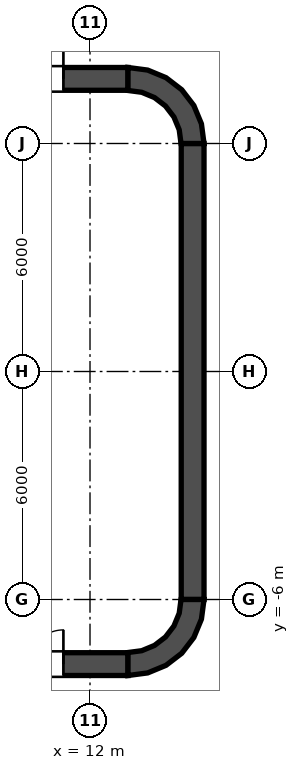
"""IFC4 building model, lengths in metres.
Left out: names, types, materials, properties, quantities, classifications, styles, units other than length and angle.
Written with IfcOpenShell. Run it as: python <this file> out.ifc"""

import sys

from ifc_helpers import new_model, si_unit, direction, frame, frame_2d, origin, place, context, subcontext, project, spatial, polyline, rectangle, outline, extrude, element, fill, save


model = new_model("IFC4")
c1 = context("Model", 3, precision=1e-05, world=origin(), true_north=direction((0.0, 1.0)))
c2 = subcontext(c1, "Body", "Model", "MODEL_VIEW")
j1 = project(units=[si_unit("LENGTHUNIT", "METRE"), si_unit("PLANEANGLEUNIT", "RADIAN")], contexts=[c1])
p1 = place(None, origin())
s1 = spatial("IfcSite", under=j1, at=p1, CompositionType="ELEMENT")
p2 = place(p1, origin())
s2 = spatial("IfcBuilding", under=s1, at=p2, CompositionType="ELEMENT")
p3 = place(p2, frame((0.0, 0.0, 31.4)))
s3 = spatial("IfcBuildingStorey", under=s2, at=p3, CompositionType="ELEMENT", Elevation=31.4)
p4 = place(p3, frame((-13.0, 7.7, 0.0), z_axis=(0.0, 0.0, 1.0), x_axis=(1.0, 0.0, 0.0)))
e1 = element("IfcWall", 1, at=p4, inside=s3, PredefinedType="SHEAR", context=c2, shape_type="SweptSolid", body=[
    extrude(rectangle(XDim=26.0, YDim=0.6, at=frame_2d((13.0, 0.0))), origin(), (0.0, 0.0, 1.0), 6.0),
])
p5 = place(p4, frame((1.7, 0.0, 0.0)))
e2 = element("IfcOpeningElement", 2, at=p5, cuts=e1, PredefinedType="OPENING", context=c2, shape_type="SweptSolid", body=[
    extrude(rectangle(XDim=1.8, YDim=2.1, at=frame_2d((0.9, 1.05))), frame((0.0, 0.3, 0.0), z_axis=(0.0, -1.0, 0.0), x_axis=(1.0, 0.0, 0.0)), (0.0, 0.0, 1.0), 0.6),
])
p6 = place(p4, frame((22.5, 0.0, 0.0)))
e3 = element("IfcOpeningElement", 3, at=p6, cuts=e1, PredefinedType="OPENING", context=c2, shape_type="SweptSolid", body=[
    extrude(rectangle(XDim=1.8, YDim=2.1, at=frame_2d((0.9, 1.05))), frame((0.0, 0.3, 0.0), z_axis=(0.0, -1.0, 0.0), x_axis=(1.0, 0.0, 0.0)), (0.0, 0.0, 1.0), 0.6),
])
p7 = place(p3, frame((-13.0, -7.7, 0.0), z_axis=(0.0, 0.0, 1.0), x_axis=(1.0, 0.0, 0.0)))
e4 = element("IfcWall", 4, at=p7, inside=s3, PredefinedType="SHEAR", context=c2, shape_type="SweptSolid", body=[
    extrude(rectangle(XDim=26.0, YDim=0.6, at=frame_2d((13.0, 0.0))), origin(), (0.0, 0.0, 1.0), 6.0),
])
p8 = place(p7, frame((1.7, 0.0, 0.0)))
e5 = element("IfcOpeningElement", 5, at=p8, cuts=e4, PredefinedType="OPENING", context=c2, shape_type="SweptSolid", body=[
    extrude(rectangle(XDim=1.8, YDim=2.1, at=frame_2d((0.9, 1.05))), frame((0.0, 0.3, 0.0), z_axis=(0.0, -1.0, 0.0), x_axis=(1.0, 0.0, 0.0)), (0.0, 0.0, 1.0), 0.6),
])
p9 = place(p7, frame((22.5, 0.0, 0.0)))
e6 = element("IfcOpeningElement", 6, at=p9, cuts=e4, PredefinedType="OPENING", context=c2, shape_type="SweptSolid", body=[
    extrude(rectangle(XDim=1.8, YDim=2.1, at=frame_2d((0.9, 1.05))), frame((0.0, 0.3, 0.0), z_axis=(0.0, -1.0, 0.0), x_axis=(1.0, 0.0, 0.0)), (0.0, 0.0, 1.0), 0.6),
])
p10 = place(p3, frame((14.7, -6.0, 0.0), z_axis=(0.0, 0.0, 1.0), x_axis=(0.0, 1.0, 0.0)))
e7 = element("IfcWall", 7, at=p10, inside=s3, PredefinedType="SHEAR", context=c2, shape_type="SweptSolid", body=[
    extrude(rectangle(XDim=12.0, YDim=0.6, at=frame_2d((6.0, 0.0))), origin(), (0.0, 0.0, 1.0), 6.0),
])
p11 = place(p3, origin())
e8 = element("IfcWall", 8, at=p11, inside=s3, PredefinedType="SHEAR", context=c2, shape_type="SweptSolid", body=[
    extrude(outline(polyline([(13.0, 8.0), (13.0, 7.395), (13.361, 7.347), (13.698, 7.208), (13.986, 6.986), (14.208, 6.698), (14.347, 6.361), (14.395, 6.0), (15.0, 6.0), (14.932, 6.518), (14.732, 7.0), (14.414, 7.414), (14.0, 7.732), (13.518, 7.932), (13.0, 8.0)])), origin(), (0.0, 0.0, 1.0), 6.0),
])
e9 = element("IfcWall", 9, at=p11, inside=s3, PredefinedType="SHEAR", context=c2, shape_type="SweptSolid", body=[
    extrude(outline(polyline([(15.0, -6.0), (14.395, -6.0), (14.347, -6.361), (14.208, -6.698), (13.986, -6.986), (13.698, -7.208), (13.361, -7.347), (13.0, -7.395), (13.0, -8.0), (13.518, -7.932), (14.0, -7.732), (14.414, -7.414), (14.732, -7.0), (14.932, -6.518), (15.0, -6.0)])), origin(), (0.0, 0.0, 1.0), 6.0),
])
p12 = place(p3, frame((11.8, -7.4, 0.0), z_axis=(0.0, 0.0, 1.0), x_axis=(0.0, 1.0, 0.0)))
e10 = element("IfcWall", 10, at=p12, inside=s3, PredefinedType="SOLIDWALL", context=c2, shape_type="SweptSolid", body=[
    extrude(rectangle(XDim=14.8, YDim=0.4, at=frame_2d((7.4, 0.0))), origin(), (0.0, 0.0, 1.0), 5.8),
])
p13 = place(p12, frame((11.2, 0.0, 0.0)))
e11 = element("IfcOpeningElement", 11, at=p13, cuts=e10, PredefinedType="OPENING", context=c2, shape_type="SweptSolid", body=[
    extrude(rectangle(XDim=1.1, YDim=2.1, at=frame_2d((0.55, 1.05))), frame((0.0, 0.2, 0.0), z_axis=(0.0, -1.0, 0.0), x_axis=(1.0, 0.0, 0.0)), (0.0, 0.0, 1.0), 0.4),
])
p14 = place(p12, frame((8.3, 0.0, 0.0)))
e12 = element("IfcOpeningElement", 12, at=p14, cuts=e10, PredefinedType="OPENING", context=c2, shape_type="SweptSolid", body=[
    extrude(rectangle(XDim=1.1, YDim=2.1, at=frame_2d((0.55, 1.05))), frame((0.0, 0.2, 0.0), z_axis=(0.0, -1.0, 0.0), x_axis=(1.0, 0.0, 0.0)), (0.0, 0.0, 1.0), 0.4),
])
p15 = place(p12, frame((5.4, 0.0, 0.0)))
e13 = element("IfcOpeningElement", 13, at=p15, cuts=e10, PredefinedType="OPENING", context=c2, shape_type="SweptSolid", body=[
    extrude(rectangle(XDim=1.1, YDim=2.1, at=frame_2d((0.55, 1.05))), frame((0.0, 0.2, 0.0), z_axis=(0.0, -1.0, 0.0), x_axis=(1.0, 0.0, 0.0)), (0.0, 0.0, 1.0), 0.4),
])
p16 = place(p12, frame((13.552, 0.0, 0.0)))
e14 = element("IfcOpeningElement", 14, at=p16, cuts=e10, PredefinedType="OPENING", context=c2, shape_type="SweptSolid", body=[
    extrude(rectangle(XDim=0.9, YDim=2.1, at=frame_2d((0.45, 1.05))), frame((0.0, 0.2, 0.0), z_axis=(0.0, -1.0, 0.0), x_axis=(1.0, 0.0, 0.0)), (0.0, 0.0, 1.0), 0.4),
])
p17 = place(p12, frame((0.347, 0.0, 0.0)))
e15 = element("IfcOpeningElement", 15, at=p17, cuts=e10, PredefinedType="OPENING", context=c2, shape_type="SweptSolid", body=[
    extrude(rectangle(XDim=0.9, YDim=2.1, at=frame_2d((0.45, 1.05))), frame((0.0, 0.2, 0.0), z_axis=(0.0, -1.0, 0.0), x_axis=(1.0, 0.0, 0.0)), (0.0, 0.0, 1.0), 0.4),
])
e16 = element("IfcWall", 16, at=p11, inside=s3, PredefinedType="SOLIDWALL", context=c2, shape_type="SweptSolid", body=[
    extrude(outline(polyline([(12.0, -5.675), (12.0, -5.925), (14.15, -5.925), (14.4, -5.925), (14.4, -5.675), (14.4, -3.025), (14.4, -2.775), (14.4, -0.125), (14.4, 0.125), (14.4, 2.775), (14.4, 3.025), (14.4, 5.675), (14.4, 5.925), (14.15, 5.925), (12.0, 5.925), (12.0, 5.675), (14.15, 5.675), (14.15, 3.025), (12.0, 3.025), (12.0, 2.775), (14.15, 2.775), (14.15, 0.125), (12.0, 0.125), (12.0, -0.125), (14.15, -0.125), (14.15, -2.775), (12.0, -2.775), (12.0, -3.025), (14.15, -3.025), (14.15, -5.675), (12.0, -5.675)])), origin(), (0.0, 0.0, 1.0), 5.8),
])
p18 = place(p13, origin())
e17 = element("IfcDoor", 17, at=p18, inside=s3, OperationType="DOUBLE_DOOR_SLIDING", PredefinedType="DOOR", context=c2, shape_type="SweptSolid", body=[
    extrude(rectangle(XDim=1.1, YDim=2.1, at=frame_2d((0.55, 1.05))), frame((0.0, 0.025, 0.0), z_axis=(0.0, -1.0, 0.0), x_axis=(1.0, 0.0, 0.0)), (0.0, 0.0, 1.0), 0.05),
])
fill(e11, e17)
p19 = place(p14, origin())
e18 = element("IfcDoor", 18, at=p19, inside=s3, OperationType="DOUBLE_DOOR_SLIDING", PredefinedType="DOOR", context=c2, shape_type="SweptSolid", body=[
    extrude(rectangle(XDim=1.1, YDim=2.1, at=frame_2d((0.55, 1.05))), frame((0.0, 0.025, 0.0), z_axis=(0.0, -1.0, 0.0), x_axis=(1.0, 0.0, 0.0)), (0.0, 0.0, 1.0), 0.05),
])
fill(e12, e18)
p20 = place(p15, origin())
e19 = element("IfcDoor", 19, at=p20, inside=s3, OperationType="DOUBLE_DOOR_SLIDING", PredefinedType="DOOR", context=c2, shape_type="SweptSolid", body=[
    extrude(rectangle(XDim=1.1, YDim=2.1, at=frame_2d((0.55, 1.05))), frame((0.0, 0.025, 0.0), z_axis=(0.0, -1.0, 0.0), x_axis=(1.0, 0.0, 0.0)), (0.0, 0.0, 1.0), 0.05),
])
fill(e13, e19)
p21 = place(p16, origin())
e20 = element("IfcDoor", 20, at=p21, inside=s3, OperationType="SINGLE_SWING_RIGHT", PredefinedType="DOOR", context=c2, shape_type="SweptSolid", body=[
    extrude(rectangle(XDim=0.9, YDim=2.1, at=frame_2d((0.45, 1.05))), frame((0.0, 0.025, 0.0), z_axis=(0.0, -1.0, 0.0), x_axis=(1.0, 0.0, 0.0)), (0.0, 0.0, 1.0), 0.05),
])
fill(e14, e20)
p22 = place(p17, origin())
e21 = element("IfcDoor", 21, at=p22, inside=s3, OperationType="SINGLE_SWING_RIGHT", PredefinedType="DOOR", context=c2, shape_type="SweptSolid", body=[
    extrude(rectangle(XDim=0.9, YDim=2.1, at=frame_2d((0.45, 1.05))), frame((0.0, 0.025, 0.0), z_axis=(0.0, -1.0, 0.0), x_axis=(1.0, 0.0, 0.0)), (0.0, 0.0, 1.0), 0.05),
])
fill(e15, e21)
p23 = place(p6, origin())
e22 = element("IfcDoor", 22, at=p23, inside=s3, OperationType="DOUBLE_DOOR_SINGLE_SWING", PredefinedType="DOOR", context=c2, shape_type="SweptSolid", body=[
    extrude(rectangle(XDim=1.8, YDim=2.1, at=frame_2d((0.9, 1.05))), frame((0.0, 0.025, 0.0), z_axis=(0.0, -1.0, 0.0), x_axis=(1.0, 0.0, 0.0)), (0.0, 0.0, 1.0), 0.05),
])
fill(e3, e22)
p24 = place(p9, origin())
e23 = element("IfcDoor", 23, at=p24, inside=s3, OperationType="DOUBLE_DOOR_SINGLE_SWING", PredefinedType="DOOR", context=c2, shape_type="SweptSolid", body=[
    extrude(rectangle(XDim=1.8, YDim=2.1, at=frame_2d((0.9, 1.05))), frame((0.0, 0.025, 0.0), z_axis=(0.0, -1.0, 0.0), x_axis=(1.0, 0.0, 0.0)), (0.0, 0.0, 1.0), 0.05),
])
fill(e6, e23)
save(model, sys.argv[1])
